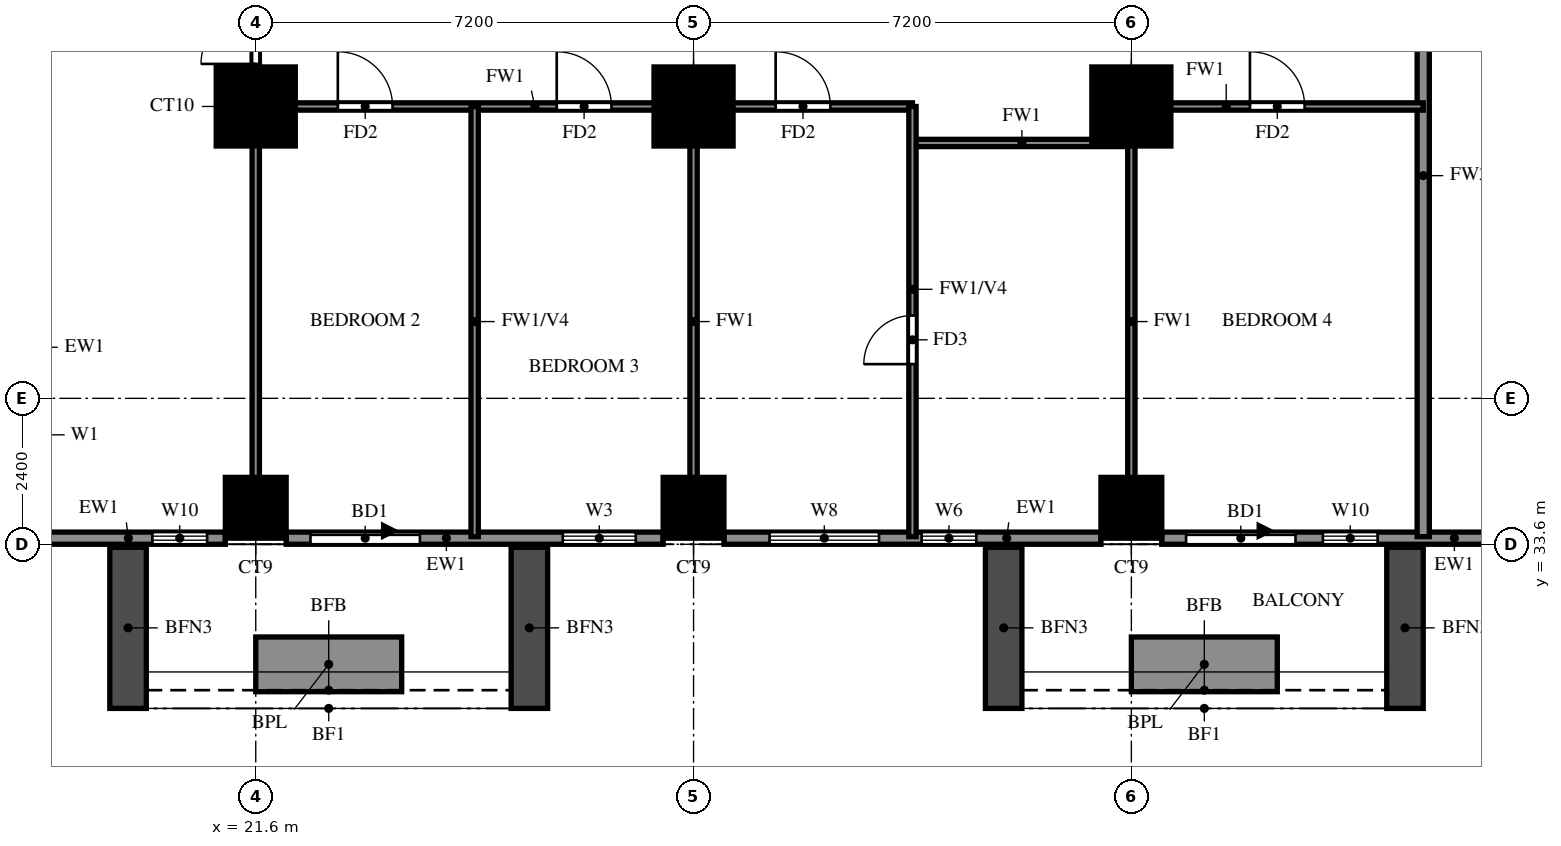
"""IFC4 building model, lengths in metres.
Left out: names, types, materials, properties, quantities, classifications, styles, units other than length and angle.
Written with IfcOpenShell. Run it as: python <this file> out.ifc"""

import sys

from ifc_helpers import new_model, si_unit, direction, frame, frame_2d, origin, origin_2d, place, context, subcontext, project, spatial, rectangle, extrude, source, transform, mapped, element, fill, save


model = new_model("IFC4")
c1 = context("Model", 3, precision=1e-05, world=origin(), true_north=direction((0.0, 1.0)))
c2 = subcontext(c1, "Body", "Model", "MODEL_VIEW")
j1 = project(units=[si_unit("LENGTHUNIT", "METRE"), si_unit("PLANEANGLEUNIT", "RADIAN")], contexts=[c1])
p1 = place(None, origin())
s1 = spatial("IfcSite", under=j1, at=p1, CompositionType="ELEMENT")
p2 = place(p1, origin())
s2 = spatial("IfcBuilding", under=s1, at=p2, CompositionType="ELEMENT")
p3 = place(p2, frame((0.0, 0.0, 62.0)))
s3 = spatial("IfcBuildingStorey", under=s2, at=p3, CompositionType="ELEMENT", Elevation=62.0)
m1 = source(origin(), c2, "Body", "SweptSolid", [
    extrude(rectangle(XDim=1.0, YDim=1.0, at=origin_2d()), origin(), (0.0, 0.0, 1.0), 3.18),
])
for number, where, z_axis, x_axis in (
    (1, (21.6, 34.2, 0.0), (0.0, 0.0, 1.0), (1.0, 0.0, 0.0)),
    (2, (28.8, 34.2, 0.0), (0.0, 0.0, 1.0), (1.0, 0.0, 0.0)),
    (3, (36.0, 34.2, 0.0), (0.0, 0.0, 1.0), (1.0, 0.0, 0.0)),
):
    element("IfcColumn", number, at=place(p3, frame(where, z_axis=z_axis, x_axis=x_axis)), inside=s3, PredefinedType="COLUMN", context=c2, shape_type="MappedRepresentation", body=[
        mapped(m1, transform((0.0, 0.0, 0.0))),
    ])
m2 = source(origin(), c2, "Body", "SweptSolid", [
    extrude(rectangle(XDim=1.3, YDim=1.3, at=origin_2d()), origin(), (0.0, 0.0, 1.0), 3.18),
])
for number, where, z_axis, x_axis in (
    (4, (21.6, 40.8, 0.0), (0.0, 0.0, 1.0), (1.0, 0.0, 0.0)),
    (5, (28.8, 40.8, 0.0), (0.0, 0.0, 1.0), (1.0, 0.0, 0.0)),
    (6, (36.0, 40.8, 0.0), (0.0, 0.0, 1.0), (1.0, 0.0, 0.0)),
):
    element("IfcColumn", number, at=place(p3, frame(where, z_axis=z_axis, x_axis=x_axis)), inside=s3, PredefinedType="COLUMN", context=c2, shape_type="MappedRepresentation", body=[
        mapped(m2, transform((0.0, 0.0, 0.0))),
    ])
p4 = place(p3, frame((18.2, 33.7, 0.0), z_axis=(0.0, 0.0, 1.0), x_axis=(1.0, 0.0, 0.0)))
e7 = element("IfcWall", 7, at=p4, inside=s3, PredefinedType="SOLIDWALL", context=c2, shape_type="SweptSolid", body=[
    extrude(rectangle(XDim=2.9, YDim=0.2, at=frame_2d((1.45, 0.0))), origin(), (0.0, 0.0, 1.0), 3.18),
])
p5 = place(p4, frame((1.7, 0.0, 0.6)))
e8 = element("IfcOpeningElement", 8, at=p5, cuts=e7, PredefinedType="OPENING", context=c2, shape_type="SweptSolid", body=[
    extrude(rectangle(XDim=0.9, YDim=2.4, at=frame_2d((0.45, 1.2))), frame((0.0, 0.11, 0.0), z_axis=(0.0, -1.0, 0.0), x_axis=(1.0, 0.0, 0.0)), (0.0, 0.0, 1.0), 0.22),
])
p6 = place(p3, frame((22.1, 33.7, 0.0), z_axis=(0.0, 0.0, 1.0), x_axis=(1.0, 0.0, 0.0)))
e9 = element("IfcWall", 9, at=p6, inside=s3, PredefinedType="SOLIDWALL", context=c2, shape_type="SweptSolid", body=[
    extrude(rectangle(XDim=6.2, YDim=0.2, at=frame_2d((3.1, 0.0))), origin(), (0.0, 0.0, 1.0), 3.18),
])
p7 = place(p6, frame((0.4, 0.0, 0.0)))
e10 = element("IfcOpeningElement", 10, at=p7, cuts=e9, PredefinedType="OPENING", context=c2, shape_type="SweptSolid", body=[
    extrude(rectangle(XDim=1.8, YDim=2.4, at=frame_2d((0.9, 1.2))), frame((0.0, 0.11, 0.0), z_axis=(0.0, -1.0, 0.0), x_axis=(1.0, 0.0, 0.0)), (0.0, 0.0, 1.0), 0.22),
])
p8 = place(p6, frame((4.55, 0.0, 0.6)))
e11 = element("IfcOpeningElement", 11, at=p8, cuts=e9, PredefinedType="OPENING", context=c2, shape_type="SweptSolid", body=[
    extrude(rectangle(XDim=1.2, YDim=2.4, at=frame_2d((0.6, 1.2))), frame((0.0, 0.11, 0.0), z_axis=(0.0, -1.0, 0.0), x_axis=(1.0, 0.0, 0.0)), (0.0, 0.0, 1.0), 0.22),
])
p9 = place(p3, frame((29.3, 33.7, 0.0), z_axis=(0.0, 0.0, 1.0), x_axis=(1.0, 0.0, 0.0)))
e12 = element("IfcWall", 12, at=p9, inside=s3, PredefinedType="SOLIDWALL", context=c2, shape_type="SweptSolid", body=[
    extrude(rectangle(XDim=6.2, YDim=0.2, at=frame_2d((3.1, 0.0))), origin(), (0.0, 0.0, 1.0), 3.18),
])
p10 = place(p9, frame((0.75, 0.0, 0.6)))
e13 = element("IfcOpeningElement", 13, at=p10, cuts=e12, PredefinedType="OPENING", context=c2, shape_type="SweptSolid", body=[
    extrude(rectangle(XDim=1.8, YDim=2.4, at=frame_2d((0.9, 1.2))), frame((0.0, 0.11, 0.0), z_axis=(0.0, -1.0, 0.0), x_axis=(1.0, 0.0, 0.0)), (0.0, 0.0, 1.0), 0.22),
])
p11 = place(p9, frame((3.25, 0.0, 1.5)))
e14 = element("IfcOpeningElement", 14, at=p11, cuts=e12, PredefinedType="OPENING", context=c2, shape_type="SweptSolid", body=[
    extrude(rectangle(XDim=0.9, YDim=0.9, at=frame_2d((0.45, 0.45))), frame((0.0, 0.11, 0.0), z_axis=(0.0, -1.0, 0.0), x_axis=(1.0, 0.0, 0.0)), (0.0, 0.0, 1.0), 0.22),
])
p12 = place(p3, frame((36.5, 33.7, 0.0), z_axis=(0.0, 0.0, 1.0), x_axis=(1.0, 0.0, 0.0)))
e15 = element("IfcWall", 15, at=p12, inside=s3, PredefinedType="SOLIDWALL", context=c2, shape_type="SweptSolid", body=[
    extrude(rectangle(XDim=5.5, YDim=0.2, at=frame_2d((2.75, 0.0))), origin(), (0.0, 0.0, 1.0), 3.18),
])
p13 = place(p12, frame((0.4, 0.0, 0.0)))
e16 = element("IfcOpeningElement", 16, at=p13, cuts=e15, PredefinedType="OPENING", context=c2, shape_type="SweptSolid", body=[
    extrude(rectangle(XDim=1.8, YDim=2.4, at=frame_2d((0.9, 1.2))), frame((0.0, 0.11, 0.0), z_axis=(0.0, -1.0, 0.0), x_axis=(1.0, 0.0, 0.0)), (0.0, 0.0, 1.0), 0.22),
])
p14 = place(p12, frame((2.65, 0.0, 0.6)))
e17 = element("IfcOpeningElement", 17, at=p14, cuts=e15, PredefinedType="OPENING", context=c2, shape_type="SweptSolid", body=[
    extrude(rectangle(XDim=0.9, YDim=2.4, at=frame_2d((0.45, 1.2))), frame((0.0, 0.11, 0.0), z_axis=(0.0, -1.0, 0.0), x_axis=(1.0, 0.0, 0.0)), (0.0, 0.0, 1.0), 0.22),
])
for number, where, z_axis, x_axis in (
    (18, (19.5, 33.55, 0.0), (0.0, 0.0, 1.0), (0.0, -1.0, 0.0)),
    (19, (26.1, 33.55, 0.0), (0.0, 0.0, 1.0), (0.0, -1.0, 0.0)),
):
    element("IfcWall", number, at=place(p3, frame(where, z_axis=z_axis, x_axis=x_axis)), inside=s3, PredefinedType="SOLIDWALL", context=c2, shape_type="SweptSolid", body=[
        extrude(rectangle(XDim=2.65, YDim=0.6, at=frame_2d((1.325, 0.0))), origin(), (0.0, 0.0, 1.0), 2.85),
    ])
p15 = place(p3, frame((21.6, 31.625, 0.0), z_axis=(0.0, 0.0, 1.0), x_axis=(1.0, 0.0, 0.0)))
e20 = element("IfcWall", 20, at=p15, inside=s3, PredefinedType="SOLIDWALL", context=c2, shape_type="SweptSolid", body=[
    extrude(rectangle(XDim=2.4, YDim=0.9, at=frame_2d((1.2, 0.0))), origin(), (0.0, 0.0, 1.0), 0.9),
])
for number, where, z_axis, x_axis in (
    (21, (33.9, 33.55, 0.0), (0.0, 0.0, 1.0), (0.0, -1.0, 0.0)),
    (22, (40.5, 33.55, 0.0), (0.0, 0.0, 1.0), (0.0, -1.0, 0.0)),
):
    element("IfcWall", number, at=place(p3, frame(where, z_axis=z_axis, x_axis=x_axis)), inside=s3, PredefinedType="SOLIDWALL", context=c2, shape_type="SweptSolid", body=[
        extrude(rectangle(XDim=2.65, YDim=0.6, at=frame_2d((1.325, 0.0))), origin(), (0.0, 0.0, 1.0), 2.85),
    ])
p16 = place(p3, frame((36.0, 31.625, 0.0), z_axis=(0.0, 0.0, 1.0), x_axis=(1.0, 0.0, 0.0)))
e23 = element("IfcWall", 23, at=p16, inside=s3, PredefinedType="SOLIDWALL", context=c2, shape_type="SweptSolid", body=[
    extrude(rectangle(XDim=2.4, YDim=0.9, at=frame_2d((1.2, 0.0))), origin(), (0.0, 0.0, 1.0), 0.9),
])
p17 = place(p3, frame((40.8, 33.725, 0.0), z_axis=(0.0, 0.0, 1.0), x_axis=(0.0, 1.0, 0.0)))
e24 = element("IfcWall", 24, at=p17, inside=s3, PredefinedType="SOLIDWALL", context=c2, shape_type="SweptSolid", body=[
    extrude(rectangle(XDim=11.875, YDim=0.2, at=frame_2d((5.938, 0.0))), origin(), (0.0, 0.0, 1.0), 2.28),
])
p18 = place(p17, frame((10.025, 0.0, 0.0)))
e25 = element("IfcOpeningElement", 25, at=p18, cuts=e24, PredefinedType="OPENING", context=c2, shape_type="SweptSolid", body=[
    extrude(rectangle(XDim=1.0, YDim=2.1, at=frame_2d((0.5, 1.05))), frame((0.0, 0.11, 0.0), z_axis=(0.0, -1.0, 0.0), x_axis=(1.0, 0.0, 0.0)), (0.0, 0.0, 1.0), 0.22),
])
p19 = place(p3, frame((32.4, 40.2, 0.0), z_axis=(0.0, 0.0, 1.0), x_axis=(1.0, 0.0, 0.0)))
e26 = element("IfcWall", 26, at=p19, inside=s3, PredefinedType="PARTITIONING", context=c2, shape_type="SweptSolid", body=[
    extrude(rectangle(XDim=3.6, YDim=0.12, at=frame_2d((1.8, 0.0))), origin(), (0.0, 0.0, 1.0), 3.18),
])
p20 = place(p3, frame((21.6, 40.8, 0.0), z_axis=(0.0, 0.0, 1.0), x_axis=(1.0, 0.0, 0.0)))
e27 = element("IfcWall", 27, at=p20, inside=s3, PredefinedType="PARTITIONING", context=c2, shape_type="SweptSolid", body=[
    extrude(rectangle(XDim=10.8, YDim=0.12, at=frame_2d((5.4, 0.0))), origin(), (0.0, 0.0, 1.0), 3.18),
])
p21 = place(p20, frame((1.35, 0.0, 0.0)))
e28 = element("IfcOpeningElement", 28, at=p21, cuts=e27, PredefinedType="OPENING", context=c2, shape_type="SweptSolid", body=[
    extrude(rectangle(XDim=0.9, YDim=2.1, at=frame_2d((0.45, 1.05))), frame((0.0, 0.07, 0.0), z_axis=(0.0, -1.0, 0.0), x_axis=(1.0, 0.0, 0.0)), (0.0, 0.0, 1.0), 0.14),
])
p22 = place(p20, frame((4.95, 0.0, 0.0)))
e29 = element("IfcOpeningElement", 29, at=p22, cuts=e27, PredefinedType="OPENING", context=c2, shape_type="SweptSolid", body=[
    extrude(rectangle(XDim=0.9, YDim=2.1, at=frame_2d((0.45, 1.05))), frame((0.0, 0.07, 0.0), z_axis=(0.0, -1.0, 0.0), x_axis=(1.0, 0.0, 0.0)), (0.0, 0.0, 1.0), 0.14),
])
p23 = place(p20, frame((8.55, 0.0, 0.0)))
e30 = element("IfcOpeningElement", 30, at=p23, cuts=e27, PredefinedType="OPENING", context=c2, shape_type="SweptSolid", body=[
    extrude(rectangle(XDim=0.9, YDim=2.1, at=frame_2d((0.45, 1.05))), frame((0.0, 0.07, 0.0), z_axis=(0.0, -1.0, 0.0), x_axis=(1.0, 0.0, 0.0)), (0.0, 0.0, 1.0), 0.14),
])
p24 = place(p3, frame((36.0, 40.8, 0.0), z_axis=(0.0, 0.0, 1.0), x_axis=(1.0, 0.0, 0.0)))
e31 = element("IfcWall", 31, at=p24, inside=s3, PredefinedType="PARTITIONING", context=c2, shape_type="SweptSolid", body=[
    extrude(rectangle(XDim=4.8, YDim=0.12, at=frame_2d((2.4, 0.0))), origin(), (0.0, 0.0, 1.0), 3.18),
])
p25 = place(p24, frame((1.95, 0.0, 0.0)))
e32 = element("IfcOpeningElement", 32, at=p25, cuts=e31, PredefinedType="OPENING", context=c2, shape_type="SweptSolid", body=[
    extrude(rectangle(XDim=0.9, YDim=2.1, at=frame_2d((0.45, 1.05))), frame((0.0, 0.07, 0.0), z_axis=(0.0, -1.0, 0.0), x_axis=(1.0, 0.0, 0.0)), (0.0, 0.0, 1.0), 0.14),
])
p26 = place(p3, frame((21.6, 33.725, 0.0), z_axis=(0.0, 0.0, 1.0), x_axis=(0.0, 1.0, 0.0)))
e33 = element("IfcWall", 33, at=p26, inside=s3, PredefinedType="PARTITIONING", context=c2, shape_type="SweptSolid", body=[
    extrude(rectangle(XDim=39.475, YDim=0.12, at=frame_2d((19.737, 0.0))), origin(), (0.0, 0.0, 1.0), 3.18),
])
p27 = place(p26, frame((7.775, 0.0, 0.0)))
e34 = element("IfcOpeningElement", 34, at=p27, cuts=e33, PredefinedType="OPENING", context=c2, shape_type="SweptSolid", body=[
    extrude(rectangle(XDim=0.9, YDim=2.1, at=frame_2d((0.45, 1.05))), frame((0.0, 0.07, 0.0), z_axis=(0.0, -1.0, 0.0), x_axis=(1.0, 0.0, 0.0)), (0.0, 0.0, 1.0), 0.14),
])
p28 = place(p26, frame((15.625, 0.0, 0.0)))
e35 = element("IfcOpeningElement", 35, at=p28, cuts=e33, PredefinedType="OPENING", context=c2, shape_type="SweptSolid", body=[
    extrude(rectangle(XDim=0.9, YDim=2.1, at=frame_2d((0.45, 1.05))), frame((0.0, 0.07, 0.0), z_axis=(0.0, -1.0, 0.0), x_axis=(1.0, 0.0, 0.0)), (0.0, 0.0, 1.0), 0.14),
])
p29 = place(p26, frame((19.225, 0.0, 0.0)))
e36 = element("IfcOpeningElement", 36, at=p29, cuts=e33, PredefinedType="OPENING", context=c2, shape_type="SweptSolid", body=[
    extrude(rectangle(XDim=0.9, YDim=2.1, at=frame_2d((0.45, 1.05))), frame((0.0, 0.07, 0.0), z_axis=(0.0, -1.0, 0.0), x_axis=(1.0, 0.0, 0.0)), (0.0, 0.0, 1.0), 0.14),
])
p30 = place(p26, frame((24.325, 0.0, 0.0)))
e37 = element("IfcOpeningElement", 37, at=p30, cuts=e33, PredefinedType="OPENING", context=c2, shape_type="SweptSolid", body=[
    extrude(rectangle(XDim=1.5, YDim=2.1, at=frame_2d((0.75, 1.05))), frame((0.0, 0.07, 0.0), z_axis=(0.0, -1.0, 0.0), x_axis=(1.0, 0.0, 0.0)), (0.0, 0.0, 1.0), 0.14),
])
p31 = place(p26, frame((30.025, 0.0, 0.0)))
e38 = element("IfcOpeningElement", 38, at=p31, cuts=e33, PredefinedType="OPENING", context=c2, shape_type="SweptSolid", body=[
    extrude(rectangle(XDim=0.9, YDim=2.1, at=frame_2d((0.45, 1.05))), frame((0.0, 0.07, 0.0), z_axis=(0.0, -1.0, 0.0), x_axis=(1.0, 0.0, 0.0)), (0.0, 0.0, 1.0), 0.14),
])
p32 = place(p26, frame((33.625, 0.0, 0.0)))
e39 = element("IfcOpeningElement", 39, at=p32, cuts=e33, PredefinedType="OPENING", context=c2, shape_type="SweptSolid", body=[
    extrude(rectangle(XDim=0.9, YDim=2.1, at=frame_2d((0.45, 1.05))), frame((0.0, 0.07, 0.0), z_axis=(0.0, -1.0, 0.0), x_axis=(1.0, 0.0, 0.0)), (0.0, 0.0, 1.0), 0.14),
])
p33 = place(p26, frame((37.225, 0.0, 0.0)))
e40 = element("IfcOpeningElement", 40, at=p33, cuts=e33, PredefinedType="OPENING", context=c2, shape_type="SweptSolid", body=[
    extrude(rectangle(XDim=0.9, YDim=2.1, at=frame_2d((0.45, 1.05))), frame((0.0, 0.07, 0.0), z_axis=(0.0, -1.0, 0.0), x_axis=(1.0, 0.0, 0.0)), (0.0, 0.0, 1.0), 0.14),
])
p34 = place(p3, frame((25.2, 33.725, 0.0), z_axis=(0.0, 0.0, 1.0), x_axis=(0.0, 1.0, 0.0)))
e41 = element("IfcWall", 41, at=p34, inside=s3, PredefinedType="PARTITIONING", context=c2, shape_type="SweptSolid", body=[
    extrude(rectangle(XDim=7.075, YDim=0.12, at=frame_2d((3.538, 0.0))), origin(), (0.0, 0.0, 1.0), 2.28),
])
p35 = place(p3, frame((28.8, 33.725, 0.0), z_axis=(0.0, 0.0, 1.0), x_axis=(0.0, 1.0, 0.0)))
e42 = element("IfcWall", 42, at=p35, inside=s3, PredefinedType="PARTITIONING", context=c2, shape_type="SweptSolid", body=[
    extrude(rectangle(XDim=7.075, YDim=0.12, at=frame_2d((3.538, 0.0))), origin(), (0.0, 0.0, 1.0), 3.18),
])
p36 = place(p3, frame((32.4, 33.725, 0.0), z_axis=(0.0, 0.0, 1.0), x_axis=(0.0, 1.0, 0.0)))
e43 = element("IfcWall", 43, at=p36, inside=s3, PredefinedType="PARTITIONING", context=c2, shape_type="SweptSolid", body=[
    extrude(rectangle(XDim=7.075, YDim=0.12, at=frame_2d((3.538, 0.0))), origin(), (0.0, 0.0, 1.0), 2.28),
])
p37 = place(p36, frame((2.837, 0.0, 0.0)))
e44 = element("IfcOpeningElement", 44, at=p37, cuts=e43, PredefinedType="OPENING", context=c2, shape_type="SweptSolid", body=[
    extrude(rectangle(XDim=0.8, YDim=2.1, at=frame_2d((0.4, 1.05))), frame((0.0, 0.07, 0.0), z_axis=(0.0, -1.0, 0.0), x_axis=(1.0, 0.0, 0.0)), (0.0, 0.0, 1.0), 0.14),
])
p38 = place(p3, frame((36.0, 33.725, 0.0), z_axis=(0.0, 0.0, 1.0), x_axis=(0.0, 1.0, 0.0)))
e45 = element("IfcWall", 45, at=p38, inside=s3, PredefinedType="PARTITIONING", context=c2, shape_type="SweptSolid", body=[
    extrude(rectangle(XDim=7.075, YDim=0.12, at=frame_2d((3.538, 0.0))), origin(), (0.0, 0.0, 1.0), 3.18),
])
p39 = place(p5, origin())
e46 = element("IfcWindow", 46, at=p39, inside=s3, PartitioningType="SINGLE_PANEL", PredefinedType="WINDOW", context=c2, shape_type="SweptSolid", body=[
    extrude(rectangle(XDim=0.9, YDim=2.4, at=frame_2d((0.45, 1.2))), frame((0.0, 0.03, 0.0), z_axis=(0.0, -1.0, 0.0), x_axis=(1.0, 0.0, 0.0)), (0.0, 0.0, 1.0), 0.06),
])
fill(e8, e46)
p40 = place(p7, origin())
e47 = element("IfcDoor", 47, at=p40, inside=s3, OperationType="DOUBLE_DOOR_SLIDING", PredefinedType="DOOR", context=c2, shape_type="SweptSolid", body=[
    extrude(rectangle(XDim=1.8, YDim=2.4, at=frame_2d((0.9, 1.2))), frame((0.0, 0.025, 0.0), z_axis=(0.0, -1.0, 0.0), x_axis=(1.0, 0.0, 0.0)), (0.0, 0.0, 1.0), 0.05),
])
fill(e10, e47)
p41 = place(p8, origin())
e48 = element("IfcWindow", 48, at=p41, inside=s3, PartitioningType="SINGLE_PANEL", PredefinedType="WINDOW", context=c2, shape_type="SweptSolid", body=[
    extrude(rectangle(XDim=1.2, YDim=2.4, at=frame_2d((0.6, 1.2))), frame((0.0, 0.03, 0.0), z_axis=(0.0, -1.0, 0.0), x_axis=(1.0, 0.0, 0.0)), (0.0, 0.0, 1.0), 0.06),
])
fill(e11, e48)
p42 = place(p10, origin())
e49 = element("IfcWindow", 49, at=p42, inside=s3, PartitioningType="DOUBLE_PANEL_VERTICAL", PredefinedType="WINDOW", context=c2, shape_type="SweptSolid", body=[
    extrude(rectangle(XDim=1.8, YDim=2.4, at=frame_2d((0.9, 1.2))), frame((0.0, 0.03, 0.0), z_axis=(0.0, -1.0, 0.0), x_axis=(1.0, 0.0, 0.0)), (0.0, 0.0, 1.0), 0.06),
])
fill(e13, e49)
p43 = place(p11, origin())
e50 = element("IfcWindow", 50, at=p43, inside=s3, PartitioningType="SINGLE_PANEL", PredefinedType="WINDOW", context=c2, shape_type="SweptSolid", body=[
    extrude(rectangle(XDim=0.9, YDim=0.9, at=frame_2d((0.45, 0.45))), frame((0.0, 0.03, 0.0), z_axis=(0.0, -1.0, 0.0), x_axis=(1.0, 0.0, 0.0)), (0.0, 0.0, 1.0), 0.06),
])
fill(e14, e50)
p44 = place(p13, origin())
e51 = element("IfcDoor", 51, at=p44, inside=s3, OperationType="DOUBLE_DOOR_SLIDING", PredefinedType="DOOR", context=c2, shape_type="SweptSolid", body=[
    extrude(rectangle(XDim=1.8, YDim=2.4, at=frame_2d((0.9, 1.2))), frame((0.0, 0.025, 0.0), z_axis=(0.0, -1.0, 0.0), x_axis=(1.0, 0.0, 0.0)), (0.0, 0.0, 1.0), 0.05),
])
fill(e16, e51)
p45 = place(p14, origin())
e52 = element("IfcWindow", 52, at=p45, inside=s3, PartitioningType="SINGLE_PANEL", PredefinedType="WINDOW", context=c2, shape_type="SweptSolid", body=[
    extrude(rectangle(XDim=0.9, YDim=2.4, at=frame_2d((0.45, 1.2))), frame((0.0, 0.03, 0.0), z_axis=(0.0, -1.0, 0.0), x_axis=(1.0, 0.0, 0.0)), (0.0, 0.0, 1.0), 0.06),
])
fill(e17, e52)
p46 = place(p27, origin())
e53 = element("IfcDoor", 53, at=p46, inside=s3, OperationType="SINGLE_SWING_RIGHT", PredefinedType="DOOR", context=c2, shape_type="SweptSolid", body=[
    extrude(rectangle(XDim=0.9, YDim=2.1, at=frame_2d((0.45, 1.05))), frame((0.0, 0.025, 0.0), z_axis=(0.0, -1.0, 0.0), x_axis=(1.0, 0.0, 0.0)), (0.0, 0.0, 1.0), 0.05),
])
fill(e34, e53)
p47 = place(p21, origin())
e54 = element("IfcDoor", 54, at=p47, inside=s3, OperationType="SINGLE_SWING_LEFT", PredefinedType="DOOR", context=c2, shape_type="SweptSolid", body=[
    extrude(rectangle(XDim=0.9, YDim=2.1, at=frame_2d((0.45, 1.05))), frame((0.0, 0.025, 0.0), z_axis=(0.0, -1.0, 0.0), x_axis=(1.0, 0.0, 0.0)), (0.0, 0.0, 1.0), 0.05),
])
fill(e28, e54)
p48 = place(p22, origin())
e55 = element("IfcDoor", 55, at=p48, inside=s3, OperationType="SINGLE_SWING_RIGHT", PredefinedType="DOOR", context=c2, shape_type="SweptSolid", body=[
    extrude(rectangle(XDim=0.9, YDim=2.1, at=frame_2d((0.45, 1.05))), frame((0.0, 0.025, 0.0), z_axis=(0.0, -1.0, 0.0), x_axis=(1.0, 0.0, 0.0)), (0.0, 0.0, 1.0), 0.05),
])
fill(e29, e55)
p49 = place(p23, origin())
e56 = element("IfcDoor", 56, at=p49, inside=s3, OperationType="SINGLE_SWING_LEFT", PredefinedType="DOOR", context=c2, shape_type="SweptSolid", body=[
    extrude(rectangle(XDim=0.9, YDim=2.1, at=frame_2d((0.45, 1.05))), frame((0.0, 0.025, 0.0), z_axis=(0.0, -1.0, 0.0), x_axis=(1.0, 0.0, 0.0)), (0.0, 0.0, 1.0), 0.05),
])
fill(e30, e56)
p50 = place(p37, origin())
e57 = element("IfcDoor", 57, at=p50, inside=s3, OperationType="SINGLE_SWING_LEFT", PredefinedType="DOOR", context=c2, shape_type="SweptSolid", body=[
    extrude(rectangle(XDim=0.8, YDim=2.1, at=frame_2d((0.4, 1.05))), frame((0.0, 0.025, 0.0), z_axis=(0.0, -1.0, 0.0), x_axis=(1.0, 0.0, 0.0)), (0.0, 0.0, 1.0), 0.05),
])
fill(e44, e57)
p51 = place(p25, origin())
e58 = element("IfcDoor", 58, at=p51, inside=s3, OperationType="SINGLE_SWING_RIGHT", PredefinedType="DOOR", context=c2, shape_type="SweptSolid", body=[
    extrude(rectangle(XDim=0.9, YDim=2.1, at=frame_2d((0.45, 1.05))), frame((0.0, 0.025, 0.0), z_axis=(0.0, -1.0, 0.0), x_axis=(1.0, 0.0, 0.0)), (0.0, 0.0, 1.0), 0.05),
])
fill(e32, e58)
save(model, sys.argv[1])
